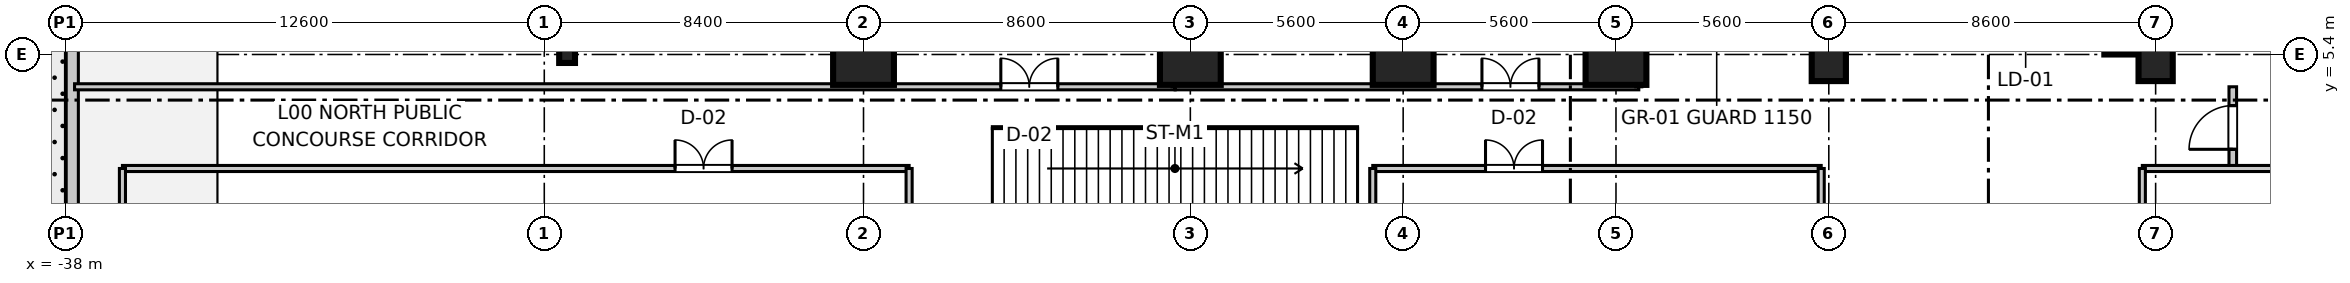
"""IFC4 building model, lengths in metres.
Left out: names, types, materials, properties, quantities, classifications, styles, units other than length and angle.
Written with IfcOpenShell. Run it as: python <this file> out.ifc"""

import sys

from ifc_helpers import new_model, si_unit, direction, frame, frame_2d, origin, origin_2d, place, context, subcontext, project, spatial, rectangle, i_section, extrude, source, transform, mapped, element, fill, save


model = new_model("IFC4")
c1 = context("Model", 3, precision=1e-05, world=origin(), true_north=direction((0.0, 1.0)))
c2 = subcontext(c1, "Body", "Model", "MODEL_VIEW")
j1 = project(units=[si_unit("LENGTHUNIT", "METRE"), si_unit("PLANEANGLEUNIT", "RADIAN")], contexts=[c1])
p1 = place(None, origin())
s1 = spatial("IfcSite", under=j1, at=p1, CompositionType="ELEMENT")
p2 = place(p1, origin())
s2 = spatial("IfcBuilding", under=s1, at=p2, CompositionType="ELEMENT")
p3 = place(p2, origin())
s3 = spatial("IfcBuildingStorey", under=s2, at=p3, CompositionType="ELEMENT", Elevation=0.0)
m1 = source(origin(), c2, "Body", "SweptSolid", [
    extrude(rectangle(XDim=1.6, YDim=1.6, at=origin_2d()), origin(), (0.0, 0.0, 1.0), 5.355),
])
for number, where, z_axis, x_axis in (
    (1, (-17.0, 5.4, 0.0), (0.0, 0.0, 1.0), (1.0, 0.0, 0.0)),
    (2, (-8.4, 5.4, 0.0), (0.0, 0.0, 1.0), (1.0, 0.0, 0.0)),
    (3, (-2.8, 5.4, 0.0), (0.0, 0.0, 1.0), (1.0, 0.0, 0.0)),
    (4, (2.8, 5.4, 0.0), (0.0, 0.0, 1.0), (1.0, 0.0, 0.0)),
):
    element("IfcColumn", number, at=place(p3, frame(where, z_axis=z_axis, x_axis=x_axis)), inside=s3, PredefinedType="COLUMN", context=c2, shape_type="MappedRepresentation", body=[
        mapped(m1, transform((0.0, 0.0, 0.0), scale=1.0)),
    ])
m2 = source(origin(), c2, "Body", "SweptSolid", [
    extrude(rectangle(XDim=0.9, YDim=1.4, at=origin_2d()), origin(), (0.0, 0.0, 1.0), 5.355),
])
for number, where, z_axis, x_axis in (
    (5, (8.4, 5.4, 0.0), (0.0, 0.0, 1.0), (1.0, 0.0, 0.0)),
    (6, (17.0, 5.4, 0.0), (0.0, 0.0, 1.0), (1.0, 0.0, 0.0)),
):
    element("IfcColumn", number, at=place(p3, frame(where, z_axis=z_axis, x_axis=x_axis)), inside=s3, PredefinedType="PILASTER", context=c2, shape_type="MappedRepresentation", body=[
        mapped(m2, transform((0.0, 0.0, 0.0), scale=1.0)),
    ])
m3 = source(origin(), c2, "Body", "SweptSolid", [
    extrude(i_section(OverallWidth=0.416, OverallDepth=0.446, WebThickness=0.025, FlangeThickness=0.04, at=origin_2d()), origin(), (0.0, 0.0, 1.0), 5.355),
])
p4 = place(p3, frame((-24.8, 5.4, 0.0), z_axis=(0.0, 0.0, 1.0), x_axis=(1.0, 0.0, 0.0)))
e7 = element("IfcColumn", 7, at=p4, inside=s3, PredefinedType="COLUMN", context=c2, shape_type="MappedRepresentation", body=[
    mapped(m3, transform((0.0, 0.0, 0.0), scale=1.0)),
])
m4 = source(origin(), c2, "Body", "SweptSolid", [
    extrude(rectangle(XDim=11.6, YDim=0.8, at=frame_2d((5.8, 0.0))), origin(), (0.0, 0.0, 1.0), 5.08),
])
p5 = place(p3, frame((16.05, 5.4, 0.0), z_axis=(0.0, 0.0, 1.0), x_axis=(0.0, 1.0, 0.0)))
e8 = element("IfcWall", 8, at=p5, inside=s3, PredefinedType="SHEAR", context=c2, shape_type="MappedRepresentation", body=[
    mapped(m4, transform((0.0, 0.0, 0.0), scale=1.0)),
])
m5 = source(origin(), c2, "Body", "SweptSolid", [
    extrude(rectangle(XDim=20.0, YDim=0.32, at=frame_2d((10.0, 0.0))), origin(), (0.0, 0.0, 1.0), 5.08),
])
p6 = place(p3, frame((-37.82, -10.0, 0.0), z_axis=(0.0, 0.0, 1.0), x_axis=(0.0, 1.0, 0.0)))
e9 = element("IfcWall", 9, at=p6, inside=s3, PredefinedType="STANDARD", context=c2, shape_type="MappedRepresentation", body=[
    mapped(m5, transform((0.0, 0.0, 0.0), scale=1.0)),
])
p7 = place(p6, frame((5.4, 0.0, 0.0)))
e10 = element("IfcOpeningElement", 10, at=p7, cuts=e9, PredefinedType="OPENING", context=c2, shape_type="SweptSolid", body=[
    extrude(rectangle(XDim=2.2, YDim=2.6, at=frame_2d((1.1, 1.3))), frame((0.0, 0.17, 0.0), z_axis=(0.0, -1.0, 0.0), x_axis=(1.0, 0.0, 0.0)), (0.0, 0.0, 1.0), 0.34),
])
p8 = place(p6, frame((8.9, 0.0, 0.0)))
e11 = element("IfcOpeningElement", 11, at=p8, cuts=e9, PredefinedType="OPENING", context=c2, shape_type="SweptSolid", body=[
    extrude(rectangle(XDim=2.2, YDim=2.6, at=frame_2d((1.1, 1.3))), frame((0.0, 0.17, 0.0), z_axis=(0.0, -1.0, 0.0), x_axis=(1.0, 0.0, 0.0)), (0.0, 0.0, 1.0), 0.34),
])
p9 = place(p6, frame((1.4, 0.0, 0.9)))
e12 = element("IfcOpeningElement", 12, at=p9, cuts=e9, PredefinedType="OPENING", context=c2, shape_type="SweptSolid", body=[
    extrude(rectangle(XDim=2.4, YDim=2.2, at=frame_2d((1.2, 1.1))), frame((0.0, 0.17, 0.0), z_axis=(0.0, -1.0, 0.0), x_axis=(1.0, 0.0, 0.0)), (0.0, 0.0, 1.0), 0.34),
])
p10 = place(p6, frame((16.0, 0.0, 0.9)))
e13 = element("IfcOpeningElement", 13, at=p10, cuts=e9, PredefinedType="OPENING", context=c2, shape_type="SweptSolid", body=[
    extrude(rectangle(XDim=2.4, YDim=2.2, at=frame_2d((1.2, 1.1))), frame((0.0, 0.17, 0.0), z_axis=(0.0, -1.0, 0.0), x_axis=(1.0, 0.0, 0.0)), (0.0, 0.0, 1.0), 0.34),
])
m6 = source(origin(), c2, "Body", "SweptSolid", [
    extrude(rectangle(XDim=2.15, YDim=0.2, at=frame_2d((1.075, 0.0))), origin(), (0.0, 0.0, 1.0), 3.4),
])
p11 = place(p3, frame((19.03, 2.4, 0.0), z_axis=(0.0, 0.0, 1.0), x_axis=(0.0, 1.0, 0.0)))
e14 = element("IfcWall", 14, at=p11, inside=s3, PredefinedType="PARTITIONING", context=c2, shape_type="MappedRepresentation", body=[
    mapped(m6, transform((0.0, 0.0, 0.0), scale=1.0)),
])
p12 = place(p11, frame((0.505, 0.0, 0.0)))
e15 = element("IfcOpeningElement", 15, at=p12, cuts=e14, PredefinedType="OPENING", context=c2, shape_type="SweptSolid", body=[
    extrude(rectangle(XDim=1.15, YDim=2.15, at=frame_2d((0.575, 1.075))), frame((0.0, 0.11, 0.0), z_axis=(0.0, -1.0, 0.0), x_axis=(1.0, 0.0, 0.0)), (0.0, 0.0, 1.0), 0.22),
])
m7 = source(origin(), c2, "Body", "SweptSolid", [
    extrude(rectangle(XDim=20.7, YDim=0.16, at=frame_2d((10.35, 0.0))), origin(), (0.0, 0.0, 1.0), 3.4),
])
p13 = place(p3, frame((-36.5, 2.4, 0.0), z_axis=(0.0, 0.0, 1.0), x_axis=(1.0, 0.0, 0.0)))
e16 = element("IfcWall", 16, at=p13, inside=s3, PredefinedType="PARTITIONING", context=c2, shape_type="MappedRepresentation", body=[
    mapped(m7, transform((0.0, 0.0, 0.0), scale=1.0)),
])
p14 = place(p13, frame((14.541, 0.0, 0.0)))
e17 = element("IfcOpeningElement", 17, at=p14, cuts=e16, PredefinedType="OPENING", context=c2, shape_type="SweptSolid", body=[
    extrude(rectangle(XDim=1.5, YDim=2.15, at=frame_2d((0.75, 1.075))), frame((0.0, 0.09, 0.0), z_axis=(0.0, -1.0, 0.0), x_axis=(1.0, 0.0, 0.0)), (0.0, 0.0, 1.0), 0.18),
])
m8 = source(origin(), c2, "Body", "SweptSolid", [
    extrude(rectangle(XDim=4.8, YDim=0.16, at=frame_2d((2.4, 0.0))), origin(), (0.0, 0.0, 1.0), 3.4),
])
for number, where, z_axis, x_axis in (
    (18, (-36.5, -2.4, 0.0), (0.0, 0.0, 1.0), (0.0, 1.0, 0.0)),
    (19, (-15.8, -2.4, 0.0), (0.0, 0.0, 1.0), (0.0, 1.0, 0.0)),
):
    element("IfcWall", number, at=place(p3, frame(where, z_axis=z_axis, x_axis=x_axis)), inside=s3, PredefinedType="PARTITIONING", context=c2, shape_type="MappedRepresentation", body=[
        mapped(m8, transform((0.0, 0.0, 0.0), scale=1.0)),
    ])
m9 = source(origin(), c2, "Body", "SweptSolid", [
    extrude(rectangle(XDim=11.8, YDim=0.16, at=frame_2d((5.9, 0.0))), origin(), (0.0, 0.0, 1.0), 3.4),
])
p15 = place(p3, frame((-3.6, 2.4, 0.0), z_axis=(0.0, 0.0, 1.0), x_axis=(1.0, 0.0, 0.0)))
e20 = element("IfcWall", 20, at=p15, inside=s3, PredefinedType="PARTITIONING", context=c2, shape_type="MappedRepresentation", body=[
    mapped(m9, transform((0.0, 0.0, 0.0), scale=1.0)),
])
p16 = place(p15, frame((2.967, 0.0, 0.0)))
e21 = element("IfcOpeningElement", 21, at=p16, cuts=e20, PredefinedType="OPENING", context=c2, shape_type="SweptSolid", body=[
    extrude(rectangle(XDim=1.5, YDim=2.15, at=frame_2d((0.75, 1.075))), frame((0.0, 0.09, 0.0), z_axis=(0.0, -1.0, 0.0), x_axis=(1.0, 0.0, 0.0)), (0.0, 0.0, 1.0), 0.18),
])
for number, where, z_axis, x_axis in (
    (22, (-3.6, -2.4, 0.0), (0.0, 0.0, 1.0), (0.0, 1.0, 0.0)),
    (23, (8.2, -2.4, 0.0), (0.0, 0.0, 1.0), (0.0, 1.0, 0.0)),
):
    element("IfcWall", number, at=place(p3, frame(where, z_axis=z_axis, x_axis=x_axis)), inside=s3, PredefinedType="PARTITIONING", context=c2, shape_type="MappedRepresentation", body=[
        mapped(m8, transform((0.0, 0.0, 0.0), scale=1.0)),
    ])
m10 = source(origin(), c2, "Body", "SweptSolid", [
    extrude(rectangle(XDim=20.15, YDim=0.16, at=frame_2d((10.075, 0.0))), origin(), (0.0, 0.0, 1.0), 3.4),
])
p17 = place(p3, frame((16.65, 2.4, 0.0), z_axis=(0.0, 0.0, 1.0), x_axis=(1.0, 0.0, 0.0)))
e24 = element("IfcWall", 24, at=p17, inside=s3, PredefinedType="PARTITIONING", context=c2, shape_type="MappedRepresentation", body=[
    mapped(m10, transform((0.0, 0.0, 0.0), scale=1.0)),
])
p18 = place(p3, frame((16.65, -2.4, 0.0), z_axis=(0.0, 0.0, 1.0), x_axis=(0.0, 1.0, 0.0)))
e25 = element("IfcWall", 25, at=p18, inside=s3, PredefinedType="PARTITIONING", context=c2, shape_type="MappedRepresentation", body=[
    mapped(m8, transform((0.0, 0.0, 0.0), scale=1.0)),
])
p19 = place(p18, frame((1.65, 0.0, 0.0)))
e26 = element("IfcOpeningElement", 26, at=p19, cuts=e25, PredefinedType="OPENING", context=c2, shape_type="SweptSolid", body=[
    extrude(rectangle(XDim=1.5, YDim=2.15, at=frame_2d((0.75, 1.075))), frame((0.0, 0.09, 0.0), z_axis=(0.0, -1.0, 0.0), x_axis=(1.0, 0.0, 0.0)), (0.0, 0.0, 1.0), 0.18),
])
m11 = source(origin(), c2, "Body", "SweptSolid", [
    extrude(rectangle(XDim=28.96, YDim=0.16, at=frame_2d((14.48, 0.0))), origin(), (0.0, 0.0, 1.0), 3.4),
])
p20 = place(p3, frame((-37.76, 4.55, 0.0), z_axis=(0.0, 0.0, 1.0), x_axis=(1.0, 0.0, 0.0)))
e27 = element("IfcWall", 27, at=p20, inside=s3, PredefinedType="PARTITIONING", context=c2, shape_type="MappedRepresentation", body=[
    mapped(m11, transform((0.0, 0.0, 0.0), scale=1.0)),
])
p21 = place(p20, frame((24.373, 0.0, 0.0)))
e28 = element("IfcOpeningElement", 28, at=p21, cuts=e27, PredefinedType="OPENING", context=c2, shape_type="SweptSolid", body=[
    extrude(rectangle(XDim=1.5, YDim=2.15, at=frame_2d((0.75, 1.075))), frame((0.0, 0.09, 0.0), z_axis=(0.0, -1.0, 0.0), x_axis=(1.0, 0.0, 0.0)), (0.0, 0.0, 1.0), 0.18),
])
m12 = source(origin(), c2, "Body", "SweptSolid", [
    extrude(rectangle(XDim=19.21, YDim=0.16, at=frame_2d((9.605, 0.0))), origin(), (0.0, 0.0, 1.0), 3.4),
])
p22 = place(p3, frame((-8.8, 4.55, 0.0), z_axis=(0.0, 0.0, 1.0), x_axis=(0.0, 1.0, 0.0)))
e29 = element("IfcWall", 29, at=p22, inside=s3, PredefinedType="PARTITIONING", context=c2, shape_type="MappedRepresentation", body=[
    mapped(m12, transform((0.0, 0.0, 0.0), scale=1.0)),
])
m13 = source(origin(), c2, "Body", "SweptSolid", [
    extrude(rectangle(XDim=12.2, YDim=0.16, at=frame_2d((6.1, 0.0))), origin(), (0.0, 0.0, 1.0), 3.4),
])
p23 = place(p3, frame((-8.8, 4.55, 0.0), z_axis=(0.0, 0.0, 1.0), x_axis=(1.0, 0.0, 0.0)))
e30 = element("IfcWall", 30, at=p23, inside=s3, PredefinedType="PARTITIONING", context=c2, shape_type="MappedRepresentation", body=[
    mapped(m13, transform((0.0, 0.0, 0.0), scale=1.0)),
])
p24 = place(p23, frame((8.073, 0.0, 0.0)))
e31 = element("IfcOpeningElement", 31, at=p24, cuts=e30, PredefinedType="OPENING", context=c2, shape_type="SweptSolid", body=[
    extrude(rectangle(XDim=1.5, YDim=2.15, at=frame_2d((0.75, 1.075))), frame((0.0, 0.09, 0.0), z_axis=(0.0, -1.0, 0.0), x_axis=(1.0, 0.0, 0.0)), (0.0, 0.0, 1.0), 0.18),
])
p25 = place(p3, frame((3.4, 4.55, 0.0), z_axis=(0.0, 0.0, 1.0), x_axis=(0.0, 1.0, 0.0)))
e32 = element("IfcWall", 32, at=p25, inside=s3, PredefinedType="PARTITIONING", context=c2, shape_type="MappedRepresentation", body=[
    mapped(m12, transform((0.0, 0.0, 0.0), scale=1.0)),
])
m14 = source(origin(), c2, "Body", "SweptSolid", [
    extrude(rectangle(XDim=1.15, YDim=2.15, at=frame_2d((0.575, 1.075))), frame((0.0, 0.025, 0.0), z_axis=(0.0, -1.0, 0.0), x_axis=(1.0, 0.0, 0.0)), (0.0, 0.0, 1.0), 0.05),
])
p26 = place(p12, frame((1.15, 0.0, 0.0), z_axis=(0.0, 0.0, 1.0), x_axis=(-1.0, 0.0, 0.0)))
e33 = element("IfcDoor", 33, at=p26, inside=s3, OperationType="SINGLE_SWING_LEFT", PredefinedType="DOOR", context=c2, shape_type="MappedRepresentation", body=[
    mapped(m14, transform((0.0, 0.0, 0.0), scale=1.0)),
])
fill(e15, e33)
m15 = source(origin(), c2, "Body", "SweptSolid", [
    extrude(rectangle(XDim=1.5, YDim=2.15, at=frame_2d((0.75, 1.075))), frame((0.0, 0.025, 0.0), z_axis=(0.0, -1.0, 0.0), x_axis=(1.0, 0.0, 0.0)), (0.0, 0.0, 1.0), 0.05),
])
p27 = place(p14, frame((1.5, 0.0, 0.0), z_axis=(0.0, 0.0, 1.0), x_axis=(-1.0, 0.0, 0.0)))
e34 = element("IfcDoor", 34, at=p27, inside=s3, OperationType="DOUBLE_DOOR_SINGLE_SWING", PredefinedType="DOOR", context=c2, shape_type="MappedRepresentation", body=[
    mapped(m15, transform((0.0, 0.0, 0.0), scale=1.0)),
])
fill(e17, e34)
p28 = place(p16, frame((1.5, 0.0, 0.0), z_axis=(0.0, 0.0, 1.0), x_axis=(-1.0, 0.0, 0.0)))
e35 = element("IfcDoor", 35, at=p28, inside=s3, OperationType="DOUBLE_DOOR_SINGLE_SWING", PredefinedType="DOOR", context=c2, shape_type="MappedRepresentation", body=[
    mapped(m15, transform((0.0, 0.0, 0.0), scale=1.0)),
])
fill(e21, e35)
p29 = place(p21, origin())
e36 = element("IfcDoor", 36, at=p29, inside=s3, OperationType="DOUBLE_DOOR_SINGLE_SWING", PredefinedType="DOOR", context=c2, shape_type="MappedRepresentation", body=[
    mapped(m15, transform((0.0, 0.0, 0.0), scale=1.0)),
])
fill(e28, e36)
p30 = place(p24, origin())
e37 = element("IfcDoor", 37, at=p30, inside=s3, OperationType="DOUBLE_DOOR_SINGLE_SWING", PredefinedType="DOOR", context=c2, shape_type="MappedRepresentation", body=[
    mapped(m15, transform((0.0, 0.0, 0.0), scale=1.0)),
])
fill(e31, e37)
save(model, sys.argv[1])
